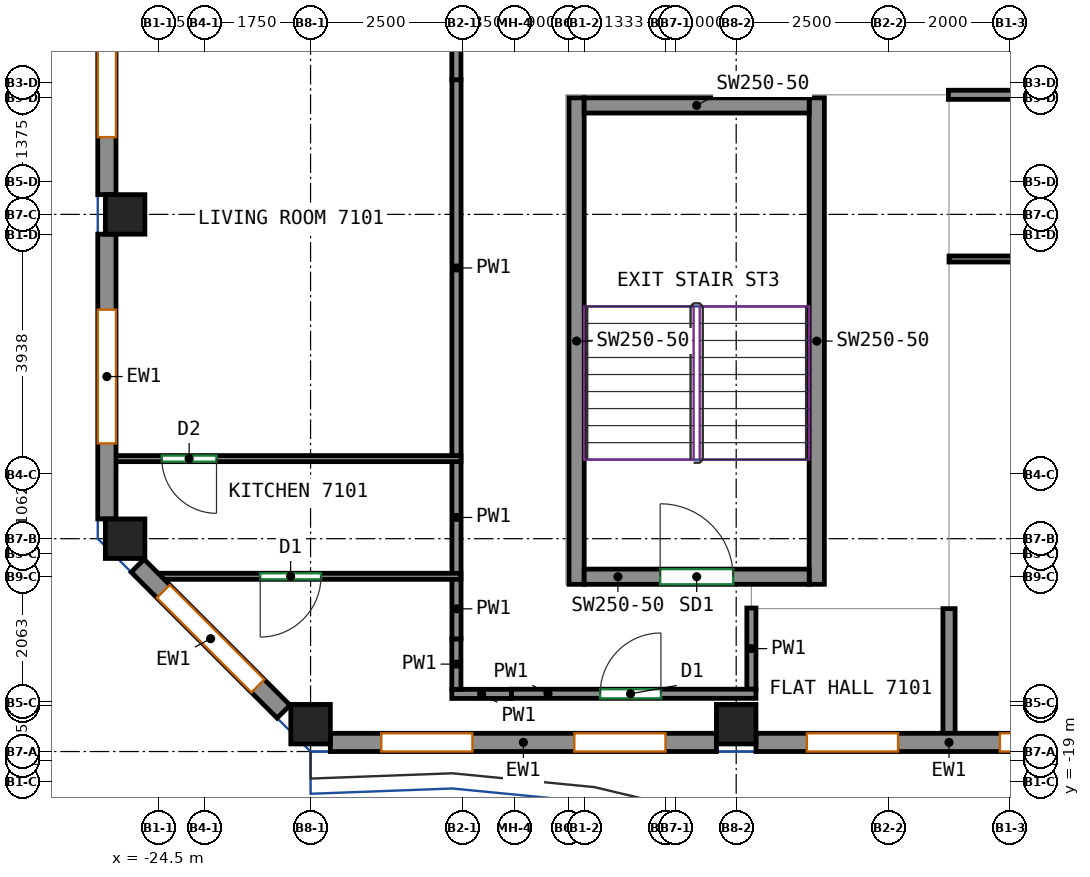
"""IFC4 building model, lengths in metres.
Left out: names, types, materials, properties, quantities, classifications, styles, units other than length and angle.
Written with IfcOpenShell. Run it as: python <this file> out.ifc"""

import sys

from ifc_helpers import new_model, si_unit, direction, frame, frame_2d, origin, origin_2d, place, context, subcontext, project, spatial, rectangle, extrude, source, transform, mapped, element, fill, save


model = new_model("IFC4")
c1 = context("Model", 3, precision=1e-05, world=origin(), true_north=direction((0.0, 1.0)))
c2 = subcontext(c1, "Body", "Model", "MODEL_VIEW")
j1 = project(units=[si_unit("LENGTHUNIT", "METRE"), si_unit("PLANEANGLEUNIT", "RADIAN")], contexts=[c1])
p1 = place(None, origin())
s1 = spatial("IfcSite", under=j1, at=p1, CompositionType="ELEMENT")
p2 = place(p1, origin())
s2 = spatial("IfcBuilding", under=s1, at=p2, CompositionType="ELEMENT")
p3 = place(p2, frame((0.0, 0.0, 287.4)))
s3 = spatial("IfcBuildingStorey", under=s2, at=p3, CompositionType="ELEMENT", Elevation=287.4)
m1 = source(origin(), c2, "Body", "SweptSolid", [
    extrude(rectangle(XDim=0.65, YDim=0.65, at=origin_2d()), origin(), (0.0, 0.0, 1.0), 3.0),
])
for number, where, z_axis, x_axis in (
    (1, (-25.05, -15.0, 0.0), (0.0, 0.0, 1.0), (1.0, 0.0, 0.0)),
    (2, (-25.05, -9.667, 0.0), (0.0, 0.0, 1.0), (1.0, 0.0, 0.0)),
    (3, (-22.0, -18.05, 0.0), (0.0, 0.0, 1.0), (1.0, 0.0, 0.0)),
    (4, (-15.0, -18.05, 0.0), (0.0, 0.0, 1.0), (1.0, 0.0, 0.0)),
):
    element("IfcColumn", number, at=place(p3, frame(where, z_axis=z_axis, x_axis=x_axis)), inside=s3, PredefinedType="COLUMN", context=c2, shape_type="MappedRepresentation", body=[
        mapped(m1, transform((0.0, 0.0, 0.0))),
    ])
m2 = source(origin(), c2, "Body", "SweptSolid", [
    extrude(rectangle(XDim=8.0, YDim=0.25, at=frame_2d((4.0, 0.0))), origin(), (0.0, 0.0, 1.0), 3.0),
])
for number, where, z_axis, x_axis in (
    (5, (-17.625, -15.75, 0.0), (0.0, 0.0, 1.0), (0.0, 1.0, 0.0)),
    (6, (-13.675, -15.75, 0.0), (0.0, 0.0, 1.0), (0.0, 1.0, 0.0)),
):
    element("IfcWall", number, at=place(p3, frame(where, z_axis=z_axis, x_axis=x_axis)), inside=s3, PredefinedType="SHEAR", context=c2, shape_type="MappedRepresentation", body=[
        mapped(m2, transform((0.0, 0.0, 0.0))),
    ])
m3 = source(origin(), c2, "Body", "SweptSolid", [
    extrude(rectangle(XDim=3.7, YDim=0.25, at=frame_2d((1.85, 0.0))), origin(), (0.0, 0.0, 1.0), 3.0),
])
p4 = place(p3, frame((-17.5, -15.625, 0.0), z_axis=(0.0, 0.0, 1.0), x_axis=(1.0, 0.0, 0.0)))
e7 = element("IfcWall", 7, at=p4, inside=s3, PredefinedType="SHEAR", context=c2, shape_type="MappedRepresentation", body=[
    mapped(m3, transform((0.0, 0.0, 0.0))),
])
p5 = place(p4, frame((1.25, 0.0, 0.0)))
e8 = element("IfcOpeningElement", 8, at=p5, cuts=e7, PredefinedType="OPENING", context=c2, shape_type="SweptSolid", body=[
    extrude(rectangle(XDim=1.2, YDim=2.1, at=frame_2d((0.6, 1.05))), frame((0.0, 0.135, 0.0), z_axis=(0.0, -1.0, 0.0), x_axis=(1.0, 0.0, 0.0)), (0.0, 0.0, 1.0), 0.27),
])
p6 = place(p3, frame((-17.5, -7.875, 0.0), z_axis=(0.0, 0.0, 1.0), x_axis=(1.0, 0.0, 0.0)))
e9 = element("IfcWall", 9, at=p6, inside=s3, PredefinedType="SHEAR", context=c2, shape_type="MappedRepresentation", body=[
    mapped(m3, transform((0.0, 0.0, 0.0))),
])
m4 = source(origin(), c2, "Body", "SweptSolid", [
    extrude(rectangle(XDim=6.35, YDim=0.3, at=frame_2d((3.175, 0.0))), origin(), (0.0, 0.0, 1.0), 3.0),
])
p7 = place(p3, frame((-21.675, -18.35, 0.0), z_axis=(0.0, 0.0, 1.0), x_axis=(1.0, 0.0, 0.0)))
e10 = element("IfcWall", 10, at=p7, inside=s3, PredefinedType="SOLIDWALL", context=c2, shape_type="MappedRepresentation", body=[
    mapped(m4, transform((0.0, 0.0, 0.0))),
])
p8 = place(p7, frame((0.837, 0.0, 0.8)))
e11 = element("IfcOpeningElement", 11, at=p8, cuts=e10, PredefinedType="OPENING", context=c2, shape_type="SweptSolid", body=[
    extrude(rectangle(XDim=1.5, YDim=2.05, at=frame_2d((0.75, 1.025))), frame((0.0, 0.16, 0.0), z_axis=(0.0, -1.0, 0.0), x_axis=(1.0, 0.0, 0.0)), (0.0, 0.0, 1.0), 0.32),
])
p9 = place(p7, frame((4.012, 0.0, 0.8)))
e12 = element("IfcOpeningElement", 12, at=p9, cuts=e10, PredefinedType="OPENING", context=c2, shape_type="SweptSolid", body=[
    extrude(rectangle(XDim=1.5, YDim=2.05, at=frame_2d((0.75, 1.025))), frame((0.0, 0.16, 0.0), z_axis=(0.0, -1.0, 0.0), x_axis=(1.0, 0.0, 0.0)), (0.0, 0.0, 1.0), 0.32),
])
p10 = place(p3, frame((-14.675, -18.35, 0.0), z_axis=(0.0, 0.0, 1.0), x_axis=(1.0, 0.0, 0.0)))
e13 = element("IfcWall", 13, at=p10, inside=s3, PredefinedType="SOLIDWALL", context=c2, shape_type="MappedRepresentation", body=[
    mapped(m4, transform((0.0, 0.0, 0.0))),
])
p11 = place(p10, frame((0.837, 0.0, 0.8)))
e14 = element("IfcOpeningElement", 14, at=p11, cuts=e13, PredefinedType="OPENING", context=c2, shape_type="SweptSolid", body=[
    extrude(rectangle(XDim=1.5, YDim=2.05, at=frame_2d((0.75, 1.025))), frame((0.0, 0.16, 0.0), z_axis=(0.0, -1.0, 0.0), x_axis=(1.0, 0.0, 0.0)), (0.0, 0.0, 1.0), 0.32),
])
p12 = place(p10, frame((4.012, 0.0, 0.8)))
e15 = element("IfcOpeningElement", 15, at=p12, cuts=e13, PredefinedType="OPENING", context=c2, shape_type="SweptSolid", body=[
    extrude(rectangle(XDim=1.5, YDim=2.05, at=frame_2d((0.75, 1.025))), frame((0.0, 0.16, 0.0), z_axis=(0.0, -1.0, 0.0), x_axis=(1.0, 0.0, 0.0)), (0.0, 0.0, 1.0), 0.32),
])
m5 = source(origin(), c2, "Body", "SweptSolid", [
    extrude(rectangle(XDim=8.184, YDim=0.3, at=frame_2d((4.092, 0.0))), origin(), (0.0, 0.0, 1.0), 3.0),
])
p13 = place(p3, frame((-25.35, -1.158, 0.0), z_axis=(0.0, 0.0, 1.0), x_axis=(0.0, -1.0, 0.0)))
e16 = element("IfcWall", 16, at=p13, inside=s3, PredefinedType="SOLIDWALL", context=c2, shape_type="MappedRepresentation", body=[
    mapped(m5, transform((0.0, 0.0, 0.0))),
])
p14 = place(p13, frame((0.946, 0.0, 0.8)))
e17 = element("IfcOpeningElement", 17, at=p14, cuts=e16, PredefinedType="OPENING", context=c2, shape_type="SweptSolid", body=[
    extrude(rectangle(XDim=2.2, YDim=2.05, at=frame_2d((1.1, 1.025))), frame((0.0, 0.16, 0.0), z_axis=(0.0, -1.0, 0.0), x_axis=(1.0, 0.0, 0.0)), (0.0, 0.0, 1.0), 0.32),
])
p15 = place(p13, frame((5.038, 0.0, 0.8)))
e18 = element("IfcOpeningElement", 18, at=p15, cuts=e16, PredefinedType="OPENING", context=c2, shape_type="SweptSolid", body=[
    extrude(rectangle(XDim=2.2, YDim=2.05, at=frame_2d((1.1, 1.025))), frame((0.0, 0.16, 0.0), z_axis=(0.0, -1.0, 0.0), x_axis=(1.0, 0.0, 0.0)), (0.0, 0.0, 1.0), 0.32),
])
m6 = source(origin(), c2, "Body", "SweptSolid", [
    extrude(rectangle(XDim=4.683, YDim=0.3, at=frame_2d((2.342, 0.0))), origin(), (0.0, 0.0, 1.0), 3.0),
])
p16 = place(p3, frame((-25.35, -9.992, 0.0), z_axis=(0.0, 0.0, 1.0), x_axis=(0.0, -1.0, 0.0)))
e19 = element("IfcWall", 19, at=p16, inside=s3, PredefinedType="SOLIDWALL", context=c2, shape_type="MappedRepresentation", body=[
    mapped(m6, transform((0.0, 0.0, 0.0))),
])
p17 = place(p16, frame((1.242, 0.0, 0.8)))
e20 = element("IfcOpeningElement", 20, at=p17, cuts=e19, PredefinedType="OPENING", context=c2, shape_type="SweptSolid", body=[
    extrude(rectangle(XDim=2.2, YDim=2.05, at=frame_2d((1.1, 1.025))), frame((0.0, 0.16, 0.0), z_axis=(0.0, -1.0, 0.0), x_axis=(1.0, 0.0, 0.0)), (0.0, 0.0, 1.0), 0.32),
])
m7 = source(origin(), c2, "Body", "SweptSolid", [
    extrude(rectangle(XDim=3.394, YDim=0.3, at=frame_2d((1.697, 0.0))), origin(), (0.0, 0.0, 1.0), 3.0),
])
p18 = place(p3, frame((-24.844, -15.444, 0.0), z_axis=(0.0, 0.0, 1.0), x_axis=(0.707070815327, -0.707142745217, 0.0)))
e21 = element("IfcWall", 21, at=p18, inside=s3, PredefinedType="SOLIDWALL", context=c2, shape_type="MappedRepresentation", body=[
    mapped(m7, transform((0.0, 0.0, 0.0))),
])
p19 = place(p18, frame((0.597, 0.0, 0.8)))
e22 = element("IfcOpeningElement", 22, at=p19, cuts=e21, PredefinedType="OPENING", context=c2, shape_type="SweptSolid", body=[
    extrude(rectangle(XDim=2.2, YDim=2.05, at=frame_2d((1.1, 1.025))), frame((0.0, 0.16, 0.0), z_axis=(0.0, -1.0, 0.0), x_axis=(1.0, 0.0, 0.0)), (0.0, 0.0, 1.0), 0.32),
])
p20 = place(p3, frame((-14.75, -17.475, 0.0), z_axis=(0.0, 0.0, 1.0), x_axis=(0.0, 1.0, 0.0)))
e23 = element("IfcWall", 23, at=p20, inside=s3, PredefinedType="PARTITIONING", context=c2, shape_type="SweptSolid", body=[
    extrude(rectangle(XDim=1.335, YDim=0.15, at=frame_2d((0.667, 0.0))), origin(), (0.0, 0.0, 1.0), 3.0),
])
p21 = place(p3, frame((-18.698, -17.55, 0.0), z_axis=(0.0, 0.0, 1.0), x_axis=(1.0, 0.0, 0.0)))
e24 = element("IfcWall", 24, at=p21, inside=s3, PredefinedType="PARTITIONING", context=c2, shape_type="SweptSolid", body=[
    extrude(rectangle(XDim=4.023, YDim=0.15, at=frame_2d((2.011, 0.0))), origin(), (0.0, 0.0, 1.0), 3.0),
])
p22 = place(p21, frame((1.46, 0.0, 0.0)))
e25 = element("IfcOpeningElement", 25, at=p22, cuts=e24, PredefinedType="OPENING", context=c2, shape_type="SweptSolid", body=[
    extrude(rectangle(XDim=1.0, YDim=2.1, at=frame_2d((0.5, 1.05))), frame((0.0, 0.085, 0.0), z_axis=(0.0, -1.0, 0.0), x_axis=(1.0, 0.0, 0.0)), (0.0, 0.0, 1.0), 0.17),
])
p23 = place(p3, frame((-19.677, -17.552, 0.0), z_axis=(0.0, 0.0, 1.0), x_axis=(1.0, 0.0, 0.0)))
e26 = element("IfcWall", 26, at=p23, inside=s3, PredefinedType="PARTITIONING", context=c2, shape_type="SweptSolid", body=[
    extrude(rectangle(XDim=0.979, YDim=0.15, at=frame_2d((0.49, 0.0))), origin(), (0.0, 0.0, 1.0), 3.0),
])
p24 = place(p3, frame((-19.602, -17.477, 0.0), z_axis=(0.0, 0.0, 1.0), x_axis=(0.0, 1.0, 0.0)))
e27 = element("IfcWall", 27, at=p24, inside=s3, PredefinedType="PARTITIONING", context=c2, shape_type="SweptSolid", body=[
    extrude(rectangle(XDim=0.829, YDim=0.15, at=frame_2d((0.415, 0.0))), origin(), (0.0, 0.0, 1.0), 3.0),
])
p25 = place(p3, frame((-19.6, -16.648, 0.0), z_axis=(0.0, 0.0, 1.0), x_axis=(0.0, 1.0, 0.0)))
e28 = element("IfcWall", 28, at=p25, inside=s3, PredefinedType="PARTITIONING", context=c2, shape_type="SweptSolid", body=[
    extrude(rectangle(XDim=0.99, YDim=0.15, at=frame_2d((0.495, 0.0))), origin(), (0.0, 0.0, 1.0), 3.0),
])
p26 = place(p3, frame((-19.6, -15.578, 0.0), z_axis=(0.0, 0.0, 1.0), x_axis=(0.0, 1.0, 0.0)))
e29 = element("IfcWall", 29, at=p26, inside=s3, PredefinedType="PARTITIONING", context=c2, shape_type="SweptSolid", body=[
    extrude(rectangle(XDim=1.855, YDim=0.15, at=frame_2d((0.927, 0.0))), origin(), (0.0, 0.0, 1.0), 3.0),
])
p27 = place(p3, frame((-19.6, -13.643, 0.0), z_axis=(0.0, 0.0, 1.0), x_axis=(0.0, 1.0, 0.0)))
e30 = element("IfcWall", 30, at=p27, inside=s3, PredefinedType="PARTITIONING", context=c2, shape_type="SweptSolid", body=[
    extrude(rectangle(XDim=6.191, YDim=0.15, at=frame_2d((3.096, 0.0))), origin(), (0.0, 0.0, 1.0), 3.0),
])
p28 = place(p3, frame((-19.602, -7.452, 0.0), z_axis=(0.0, 0.0, 1.0), x_axis=(0.0, 1.0, 0.0)))
e31 = element("IfcWall", 31, at=p28, inside=s3, PredefinedType="PARTITIONING", context=c2, shape_type="SweptSolid", body=[
    extrude(rectangle(XDim=1.381, YDim=0.15, at=frame_2d((0.69, 0.0))), origin(), (0.0, 0.0, 1.0), 3.0),
])
p29 = place(p3, frame((-11.51, -7.7, 0.0), z_axis=(0.0, 0.0, 1.0), x_axis=(1.0, 0.0, 0.0)))
e32 = element("IfcWall", 32, at=p29, inside=s3, PredefinedType="PARTITIONING", context=c2, shape_type="SweptSolid", body=[
    extrude(rectangle(XDim=21.02, YDim=0.15, at=frame_2d((10.51, 0.0))), origin(), (0.0, 0.0, 1.0), 3.0),
])
p30 = place(p29, frame((1.728, 0.0, 0.0)))
e33 = element("IfcOpeningElement", 33, at=p30, cuts=e32, PredefinedType="OPENING", context=c2, shape_type="SweptSolid", body=[
    extrude(rectangle(XDim=1.0, YDim=2.1, at=frame_2d((0.5, 1.05))), frame((0.0, 0.085, 0.0), z_axis=(0.0, -1.0, 0.0), x_axis=(1.0, 0.0, 0.0)), (0.0, 0.0, 1.0), 0.17),
])
p31 = place(p29, frame((12.604, 0.0, 0.0)))
e34 = element("IfcOpeningElement", 34, at=p31, cuts=e32, PredefinedType="OPENING", context=c2, shape_type="SweptSolid", body=[
    extrude(rectangle(XDim=1.0, YDim=2.1, at=frame_2d((0.5, 1.05))), frame((0.0, 0.085, 0.0), z_axis=(0.0, -1.0, 0.0), x_axis=(1.0, 0.0, 0.0)), (0.0, 0.0, 1.0), 0.17),
])
p32 = place(p3, frame((-19.527, -15.618, 0.0), z_axis=(0.0, 0.0, 1.0), x_axis=(-1.0, 0.0, 0.0)))
e35 = element("IfcWall", 35, at=p32, inside=s3, PredefinedType="PARTITIONING", context=c2, shape_type="SweptSolid", body=[
    extrude(rectangle(XDim=5.001, YDim=0.1, at=frame_2d((2.5, 0.0))), origin(), (0.0, 0.0, 1.0), 3.0),
])
p33 = place(p32, frame((2.301, 0.0, 0.0)))
e36 = element("IfcOpeningElement", 36, at=p33, cuts=e35, PredefinedType="OPENING", context=c2, shape_type="SweptSolid", body=[
    extrude(rectangle(XDim=1.0, YDim=2.1, at=frame_2d((0.5, 1.05))), frame((0.0, 0.06, 0.0), z_axis=(0.0, -1.0, 0.0), x_axis=(1.0, 0.0, 0.0)), (0.0, 0.0, 1.0), 0.12),
])
p34 = place(p3, frame((-11.5, -18.25, 0.0), z_axis=(0.0, 0.0, 1.0), x_axis=(0.0, 1.0, 0.0)))
e37 = element("IfcWall", 37, at=p34, inside=s3, PredefinedType="PARTITIONING", context=c2, shape_type="SweptSolid", body=[
    extrude(rectangle(XDim=2.1, YDim=0.2, at=frame_2d((1.05, 0.0))), origin(), (0.0, 0.0, 1.0), 3.0),
])
p35 = place(p3, frame((-19.527, -13.683, 0.0), z_axis=(0.0, 0.0, 1.0), x_axis=(-1.0, 0.0, 0.0)))
e38 = element("IfcWall", 38, at=p35, inside=s3, PredefinedType="PARTITIONING", context=c2, shape_type="SweptSolid", body=[
    extrude(rectangle(XDim=5.723, YDim=0.1, at=frame_2d((2.861, 0.0))), origin(), (0.0, 0.0, 1.0), 3.0),
])
p36 = place(p35, frame((4.02, 0.0, 0.0)))
e39 = element("IfcOpeningElement", 39, at=p36, cuts=e38, PredefinedType="OPENING", context=c2, shape_type="SweptSolid", body=[
    extrude(rectangle(XDim=0.9, YDim=2.1, at=frame_2d((0.45, 1.05))), frame((0.0, 0.06, 0.0), z_axis=(0.0, -1.0, 0.0), x_axis=(1.0, 0.0, 0.0)), (0.0, 0.0, 1.0), 0.12),
])
p37 = place(p3, frame((-11.5, -10.4, 0.0), z_axis=(0.0, 0.0, 1.0), x_axis=(1.0, 0.0, 0.0)))
e40 = element("IfcWall", 40, at=p37, inside=s3, PredefinedType="PARTITIONING", context=c2, shape_type="SweptSolid", body=[
    extrude(rectangle(XDim=29.25, YDim=0.1, at=frame_2d((14.625, 0.0))), origin(), (0.0, 0.0, 1.0), 3.0),
])
p38 = place(p37, frame((2.024, 0.0, 0.0)))
e41 = element("IfcOpeningElement", 41, at=p38, cuts=e40, PredefinedType="OPENING", context=c2, shape_type="SweptSolid", body=[
    extrude(rectangle(XDim=1.0, YDim=2.1, at=frame_2d((0.5, 1.05))), frame((0.0, 0.06, 0.0), z_axis=(0.0, -1.0, 0.0), x_axis=(1.0, 0.0, 0.0)), (0.0, 0.0, 1.0), 0.12),
])
p39 = place(p37, frame((7.391, 0.0, 0.0)))
e42 = element("IfcOpeningElement", 42, at=p39, cuts=e40, PredefinedType="OPENING", context=c2, shape_type="SweptSolid", body=[
    extrude(rectangle(XDim=0.9, YDim=2.1, at=frame_2d((0.45, 1.05))), frame((0.0, 0.06, 0.0), z_axis=(0.0, -1.0, 0.0), x_axis=(1.0, 0.0, 0.0)), (0.0, 0.0, 1.0), 0.12),
])
p40 = place(p37, frame((15.5, 0.0, 0.0)))
e43 = element("IfcOpeningElement", 43, at=p40, cuts=e40, PredefinedType="OPENING", context=c2, shape_type="SweptSolid", body=[
    extrude(rectangle(XDim=1.0, YDim=2.1, at=frame_2d((0.5, 1.05))), frame((0.0, 0.06, 0.0), z_axis=(0.0, -1.0, 0.0), x_axis=(1.0, 0.0, 0.0)), (0.0, 0.0, 1.0), 0.12),
])
p41 = place(p37, frame((21.71, 0.0, 0.0)))
e44 = element("IfcOpeningElement", 44, at=p41, cuts=e40, PredefinedType="OPENING", context=c2, shape_type="SweptSolid", body=[
    extrude(rectangle(XDim=0.9, YDim=2.1, at=frame_2d((0.45, 1.05))), frame((0.0, 0.06, 0.0), z_axis=(0.0, -1.0, 0.0), x_axis=(1.0, 0.0, 0.0)), (0.0, 0.0, 1.0), 0.12),
])
p42 = place(p37, frame((26.444, 0.0, 0.0)))
e45 = element("IfcOpeningElement", 45, at=p42, cuts=e40, PredefinedType="OPENING", context=c2, shape_type="SweptSolid", body=[
    extrude(rectangle(XDim=0.9, YDim=2.1, at=frame_2d((0.45, 1.05))), frame((0.0, 0.06, 0.0), z_axis=(0.0, -1.0, 0.0), x_axis=(1.0, 0.0, 0.0)), (0.0, 0.0, 1.0), 0.12),
])
p43 = place(p8, origin())
e46 = element("IfcWindow", 46, at=p43, inside=s3, PartitioningType="SINGLE_PANEL", PredefinedType="WINDOW", context=c2, shape_type="SweptSolid", body=[
    extrude(rectangle(XDim=1.5, YDim=2.05, at=frame_2d((0.75, 1.025))), frame((0.0, 0.03, 0.0), z_axis=(0.0, -1.0, 0.0), x_axis=(1.0, 0.0, 0.0)), (0.0, 0.0, 1.0), 0.06),
])
fill(e11, e46)
p44 = place(p9, origin())
e47 = element("IfcWindow", 47, at=p44, inside=s3, PartitioningType="SINGLE_PANEL", PredefinedType="WINDOW", context=c2, shape_type="SweptSolid", body=[
    extrude(rectangle(XDim=1.5, YDim=2.05, at=frame_2d((0.75, 1.025))), frame((0.0, 0.03, 0.0), z_axis=(0.0, -1.0, 0.0), x_axis=(1.0, 0.0, 0.0)), (0.0, 0.0, 1.0), 0.06),
])
fill(e12, e47)
p45 = place(p11, origin())
e48 = element("IfcWindow", 48, at=p45, inside=s3, PartitioningType="SINGLE_PANEL", PredefinedType="WINDOW", context=c2, shape_type="SweptSolid", body=[
    extrude(rectangle(XDim=1.5, YDim=2.05, at=frame_2d((0.75, 1.025))), frame((0.0, 0.03, 0.0), z_axis=(0.0, -1.0, 0.0), x_axis=(1.0, 0.0, 0.0)), (0.0, 0.0, 1.0), 0.06),
])
fill(e14, e48)
p46 = place(p12, origin())
e49 = element("IfcWindow", 49, at=p46, inside=s3, PartitioningType="SINGLE_PANEL", PredefinedType="WINDOW", context=c2, shape_type="SweptSolid", body=[
    extrude(rectangle(XDim=1.5, YDim=2.05, at=frame_2d((0.75, 1.025))), frame((0.0, 0.03, 0.0), z_axis=(0.0, -1.0, 0.0), x_axis=(1.0, 0.0, 0.0)), (0.0, 0.0, 1.0), 0.06),
])
fill(e15, e49)
p47 = place(p15, origin())
e50 = element("IfcWindow", 50, at=p47, inside=s3, PartitioningType="SINGLE_PANEL", PredefinedType="WINDOW", context=c2, shape_type="SweptSolid", body=[
    extrude(rectangle(XDim=2.2, YDim=2.05, at=frame_2d((1.1, 1.025))), frame((0.0, 0.03, 0.0), z_axis=(0.0, -1.0, 0.0), x_axis=(1.0, 0.0, 0.0)), (0.0, 0.0, 1.0), 0.06),
])
fill(e18, e50)
p48 = place(p17, origin())
e51 = element("IfcWindow", 51, at=p48, inside=s3, PartitioningType="SINGLE_PANEL", PredefinedType="WINDOW", context=c2, shape_type="SweptSolid", body=[
    extrude(rectangle(XDim=2.2, YDim=2.05, at=frame_2d((1.1, 1.025))), frame((0.0, 0.03, 0.0), z_axis=(0.0, -1.0, 0.0), x_axis=(1.0, 0.0, 0.0)), (0.0, 0.0, 1.0), 0.06),
])
fill(e20, e51)
p49 = place(p19, origin())
e52 = element("IfcWindow", 52, at=p49, inside=s3, PartitioningType="SINGLE_PANEL", PredefinedType="WINDOW", context=c2, shape_type="SweptSolid", body=[
    extrude(rectangle(XDim=2.2, YDim=2.05, at=frame_2d((1.1, 1.025))), frame((0.0, 0.03, 0.0), z_axis=(0.0, -1.0, 0.0), x_axis=(1.0, 0.0, 0.0)), (0.0, 0.0, 1.0), 0.06),
])
fill(e22, e52)
p50 = place(p5, origin())
e53 = element("IfcDoor", 53, at=p50, inside=s3, OperationType="DOUBLE_DOOR_SINGLE_SWING", PredefinedType="DOOR", context=c2, shape_type="SweptSolid", body=[
    extrude(rectangle(XDim=1.2, YDim=2.1, at=frame_2d((0.6, 1.05))), frame((0.0, 0.025, 0.0), z_axis=(0.0, -1.0, 0.0), x_axis=(1.0, 0.0, 0.0)), (0.0, 0.0, 1.0), 0.05),
])
fill(e8, e53)
p51 = place(p22, origin())
e54 = element("IfcDoor", 54, at=p51, inside=s3, OperationType="SINGLE_SWING_RIGHT", PredefinedType="DOOR", context=c2, shape_type="SweptSolid", body=[
    extrude(rectangle(XDim=1.0, YDim=2.1, at=frame_2d((0.5, 1.05))), frame((0.0, 0.025, 0.0), z_axis=(0.0, -1.0, 0.0), x_axis=(1.0, 0.0, 0.0)), (0.0, 0.0, 1.0), 0.05),
])
fill(e25, e54)
p52 = place(p33, origin())
e55 = element("IfcDoor", 55, at=p52, inside=s3, OperationType="SINGLE_SWING_RIGHT", PredefinedType="DOOR", context=c2, shape_type="SweptSolid", body=[
    extrude(rectangle(XDim=1.0, YDim=2.1, at=frame_2d((0.5, 1.05))), frame((0.0, 0.025, 0.0), z_axis=(0.0, -1.0, 0.0), x_axis=(1.0, 0.0, 0.0)), (0.0, 0.0, 1.0), 0.05),
])
fill(e36, e55)
p53 = place(p36, origin())
e56 = element("IfcDoor", 56, at=p53, inside=s3, OperationType="SINGLE_SWING_LEFT", PredefinedType="DOOR", context=c2, shape_type="SweptSolid", body=[
    extrude(rectangle(XDim=0.9, YDim=2.1, at=frame_2d((0.45, 1.05))), frame((0.0, 0.025, 0.0), z_axis=(0.0, -1.0, 0.0), x_axis=(1.0, 0.0, 0.0)), (0.0, 0.0, 1.0), 0.05),
])
fill(e39, e56)
save(model, sys.argv[1])
